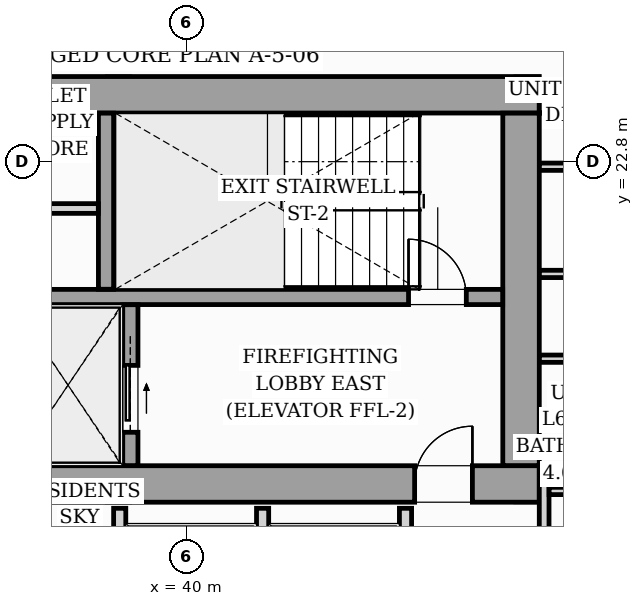
"""IFC4 building model, lengths in metres.
Left out: names, types, materials, properties, quantities, classifications, styles, units other than length and angle.
Written with IfcOpenShell. Run it as: python <this file> out.ifc"""

import sys

from ifc_helpers import new_model, si_unit, direction, frame, frame_2d, origin, origin_2d, place, context, subcontext, project, spatial, rectangle, i_section, extrude, source, transform, mapped, element, fill, save


model = new_model("IFC4")
c1 = context("Model", 3, precision=1e-05, world=origin(), true_north=direction((0.0, 1.0)))
c2 = subcontext(c1, "Body", "Model", "MODEL_VIEW")
j1 = project(units=[si_unit("LENGTHUNIT", "METRE"), si_unit("PLANEANGLEUNIT", "RADIAN")], contexts=[c1])
p1 = place(None, origin())
s1 = spatial("IfcSite", under=j1, at=p1, CompositionType="ELEMENT")
p2 = place(p1, origin())
s2 = spatial("IfcBuilding", under=s1, at=p2, CompositionType="ELEMENT")
p3 = place(p2, frame((0.0, 0.0, 223.2)))
s3 = spatial("IfcBuildingStorey", under=s2, at=p3, CompositionType="ELEMENT", Elevation=223.2)
m1 = source(origin(), c2, "Body", "SweptSolid", [
    extrude(i_section(OverallWidth=0.409, OverallDepth=0.425, WebThickness=0.033, FlangeThickness=0.052, FilletRadius=0.018, at=origin_2d()), origin(), (0.0, 0.0, 1.0), 3.296),
])
for number, where, z_axis, x_axis in (
    (1, (38.88, 17.4, 0.002), (0.0, 0.0, 1.0), (1.0, 0.0, 0.0)),
    (2, (45.6, 17.4, 0.002), (0.0, 0.0, 1.0), (1.0, 0.0, 0.0)),
    (3, (38.88, 24.0, 0.002), (0.0, 0.0, 1.0), (1.0, 0.0, 0.0)),
    (4, (45.6, 24.0, 0.002), (0.0, 0.0, 1.0), (1.0, 0.0, 0.0)),
):
    element("IfcColumn", number, at=place(p3, frame(where, z_axis=z_axis, x_axis=x_axis)), inside=s3, PredefinedType="PILASTER", context=c2, shape_type="MappedRepresentation", body=[
        mapped(m1, transform((0.0, 0.0, 0.0), scale=1.0)),
    ])
p4 = place(p3, frame((26.2, 17.5, 0.0), z_axis=(0.0, 0.0, 1.0), x_axis=(1.0, 0.0, 0.0)))
e5 = element("IfcWall", 5, at=p4, inside=s3, PredefinedType="SHEAR", context=c2, shape_type="SweptSolid", body=[
    extrude(rectangle(XDim=19.6, YDim=0.6, at=frame_2d((9.8, 0.0))), origin(), (0.0, 0.0, 1.0), 3.3),
])
p5 = place(p4, frame((0.95, 0.0, 0.0)))
e6 = element("IfcOpeningElement", 6, at=p5, cuts=e5, PredefinedType="OPENING", context=c2, shape_type="SweptSolid", body=[
    extrude(rectangle(XDim=0.95, YDim=2.06, at=frame_2d((0.475, 1.03))), frame((0.0, 0.31, 0.0), z_axis=(0.0, -1.0, 0.0), x_axis=(1.0, 0.0, 0.0)), (0.0, 0.0, 1.0), 0.62),
])
p6 = place(p4, frame((9.38, 0.0, 0.0)))
e7 = element("IfcOpeningElement", 7, at=p6, cuts=e5, PredefinedType="OPENING", context=c2, shape_type="SweptSolid", body=[
    extrude(rectangle(XDim=0.85, YDim=2.0, at=frame_2d((0.425, 1.0))), frame((0.0, 0.31, 0.0), z_axis=(0.0, -1.0, 0.0), x_axis=(1.0, 0.0, 0.0)), (0.0, 0.0, 1.0), 0.62),
])
p7 = place(p4, frame((17.55, 0.0, 0.0)))
e8 = element("IfcOpeningElement", 8, at=p7, cuts=e5, PredefinedType="OPENING", context=c2, shape_type="SweptSolid", body=[
    extrude(rectangle(XDim=0.95, YDim=2.06, at=frame_2d((0.475, 1.03))), frame((0.0, 0.31, 0.0), z_axis=(0.0, -1.0, 0.0), x_axis=(1.0, 0.0, 0.0)), (0.0, 0.0, 1.0), 0.62),
])
p8 = place(p3, frame((26.2, 23.9, 0.0), z_axis=(0.0, 0.0, 1.0), x_axis=(1.0, 0.0, 0.0)))
e9 = element("IfcWall", 9, at=p8, inside=s3, PredefinedType="SHEAR", context=c2, shape_type="SweptSolid", body=[
    extrude(rectangle(XDim=19.6, YDim=0.6, at=frame_2d((9.8, 0.0))), origin(), (0.0, 0.0, 1.0), 3.3),
])
p9 = place(p3, frame((45.5, 17.802, 0.0), z_axis=(0.0, 0.0, 1.0), x_axis=(0.0, 1.0, 0.0)))
e10 = element("IfcWall", 10, at=p9, inside=s3, PredefinedType="SHEAR", context=c2, shape_type="SweptSolid", body=[
    extrude(rectangle(XDim=5.796, YDim=0.6, at=frame_2d((2.898, 0.0))), origin(), (0.0, 0.0, 1.0), 3.3),
])
p10 = place(p3, frame((37.05, 20.575, 0.0), z_axis=(0.0, 0.0, 1.0), x_axis=(1.0, 0.0, 0.0)))
e11 = element("IfcWall", 11, at=p10, inside=s3, PredefinedType="SOLIDWALL", context=c2, shape_type="SweptSolid", body=[
    extrude(rectangle(XDim=8.148, YDim=0.25, at=frame_2d((4.074, 0.0))), origin(), (0.0, 0.0, 1.0), 3.3),
])
p11 = place(p10, frame((6.6, 0.0, 0.0)))
e12 = element("IfcOpeningElement", 12, at=p11, cuts=e11, PredefinedType="OPENING", context=c2, shape_type="SweptSolid", body=[
    extrude(rectangle(XDim=0.95, YDim=2.06, at=frame_2d((0.475, 1.03))), frame((0.0, 0.135, 0.0), z_axis=(0.0, -1.0, 0.0), x_axis=(1.0, 0.0, 0.0)), (0.0, 0.0, 1.0), 0.27),
])
p12 = place(p3, frame((38.675, 20.702, 0.0), z_axis=(0.0, 0.0, 1.0), x_axis=(0.0, 1.0, 0.0)))
e13 = element("IfcWall", 13, at=p12, inside=s3, PredefinedType="SOLIDWALL", context=c2, shape_type="SweptSolid", body=[
    extrude(rectangle(XDim=2.896, YDim=0.25, at=frame_2d((1.448, 0.0))), origin(), (0.0, 0.0, 1.0), 3.3),
])
p13 = place(p3, frame((39.075, 17.802, 0.0), z_axis=(0.0, 0.0, 1.0), x_axis=(0.0, 1.0, 0.0)))
e14 = element("IfcWall", 14, at=p13, inside=s3, PredefinedType="SOLIDWALL", context=c2, shape_type="SweptSolid", body=[
    extrude(rectangle(XDim=2.646, YDim=0.25, at=frame_2d((1.323, 0.0))), origin(), (0.0, 0.0, 1.0), 3.3),
])
p14 = place(p13, frame((0.548, 0.0, 0.0)))
e15 = element("IfcOpeningElement", 15, at=p14, cuts=e14, PredefinedType="OPENING", context=c2, shape_type="SweptSolid", body=[
    extrude(rectangle(XDim=1.1, YDim=2.08, at=frame_2d((0.55, 1.04))), frame((0.0, 0.135, 0.0), z_axis=(0.0, -1.0, 0.0), x_axis=(1.0, 0.0, 0.0)), (0.0, 0.0, 1.0), 0.27),
])
p15 = place(p3, frame((33.452, 22.03, 0.0), z_axis=(0.0, 0.0, 1.0), x_axis=(1.0, 0.0, 0.0)))
e16 = element("IfcWall", 16, at=p15, inside=s3, PredefinedType="PARTITIONING", context=c2, shape_type="SweptSolid", body=[
    extrude(rectangle(XDim=5.096, YDim=0.16, at=frame_2d((2.548, 0.0))), origin(), (0.0, 0.0, 1.0), 3.04),
])
p16 = place(p15, frame((0.538, 0.0, 0.0)))
e17 = element("IfcOpeningElement", 17, at=p16, cuts=e16, PredefinedType="OPENING", context=c2, shape_type="SweptSolid", body=[
    extrude(rectangle(XDim=0.8, YDim=2.05, at=frame_2d((0.4, 1.025))), frame((0.0, 0.09, 0.0), z_axis=(0.0, -1.0, 0.0), x_axis=(1.0, 0.0, 0.0)), (0.0, 0.0, 1.0), 0.18),
])
p17 = place(p15, frame((3.158, 0.0, 0.0)))
e18 = element("IfcOpeningElement", 18, at=p17, cuts=e16, PredefinedType="OPENING", context=c2, shape_type="SweptSolid", body=[
    extrude(rectangle(XDim=0.8, YDim=2.05, at=frame_2d((0.4, 1.025))), frame((0.0, 0.09, 0.0), z_axis=(0.0, -1.0, 0.0), x_axis=(1.0, 0.0, 0.0)), (0.0, 0.0, 1.0), 0.18),
])
for number, where, z_axis, x_axis in (
    (19, (38.9, 14.75, 0.0), (0.0, 0.0, 1.0), (0.0, 1.0, 0.0)),
    (20, (41.25, 14.75, 0.0), (0.0, 0.0, 1.0), (0.0, 1.0, 0.0)),
    (21, (43.6, 14.75, 0.0), (0.0, 0.0, 1.0), (0.0, 1.0, 0.0)),
):
    element("IfcWall", number, at=place(p3, frame(where, z_axis=z_axis, x_axis=x_axis)), inside=s3, PredefinedType="PARTITIONING", context=c2, shape_type="SweptSolid", body=[
        extrude(rectangle(XDim=2.35, YDim=0.2, at=frame_2d((1.175, 0.0))), origin(), (0.0, 0.0, 1.0), 3.04),
    ])
p18 = place(p3, frame((45.88, 13.442, 0.0), z_axis=(0.0, 0.0, 1.0), x_axis=(0.0, 1.0, 0.0)))
e22 = element("IfcWall", 22, at=p18, inside=s3, PredefinedType="PARTITIONING", context=c2, shape_type="SweptSolid", body=[
    extrude(rectangle(XDim=4.36, YDim=0.16, at=frame_2d((2.18, 0.0))), origin(), (0.0, 0.0, 1.0), 3.04),
])
p19 = place(p18, frame((0.493, 0.0, 0.0)))
e23 = element("IfcOpeningElement", 23, at=p19, cuts=e22, PredefinedType="OPENING", context=c2, shape_type="SweptSolid", body=[
    extrude(rectangle(XDim=0.95, YDim=2.06, at=frame_2d((0.475, 1.03))), frame((0.0, 0.09, 0.0), z_axis=(0.0, -1.0, 0.0), x_axis=(1.0, 0.0, 0.0)), (0.0, 0.0, 1.0), 0.18),
])
p20 = place(p3, frame((45.88, 23.598, 0.0), z_axis=(0.0, 0.0, 1.0), x_axis=(0.0, 1.0, 0.0)))
e24 = element("IfcWall", 24, at=p20, inside=s3, PredefinedType="PARTITIONING", context=c2, shape_type="SweptSolid", body=[
    extrude(rectangle(XDim=0.452, YDim=0.16, at=frame_2d((0.226, 0.0))), origin(), (0.0, 0.0, 1.0), 3.04),
])
p21 = place(p3, frame((45.962, 17.385, 0.0), z_axis=(0.0, 0.0, 1.0), x_axis=(1.0, 0.0, 0.0)))
e25 = element("IfcWall", 25, at=p21, inside=s3, PredefinedType="PARTITIONING", context=c2, shape_type="SweptSolid", body=[
    extrude(rectangle(XDim=2.256, YDim=0.12, at=frame_2d((1.128, 0.0))), origin(), (0.0, 0.0, 1.0), 2.381),
])
p22 = place(p3, frame((45.802, 19.56, 0.0), z_axis=(0.0, 0.0, 1.0), x_axis=(1.0, 0.0, 0.0)))
e26 = element("IfcWall", 26, at=p22, inside=s3, PredefinedType="PARTITIONING", context=c2, shape_type="SweptSolid", body=[
    extrude(rectangle(XDim=2.416, YDim=0.12, at=frame_2d((1.208, 0.0))), origin(), (0.0, 0.0, 1.0), 3.04),
])
p23 = place(p3, frame((45.802, 22.717, 0.0), z_axis=(0.0, 0.0, 1.0), x_axis=(1.0, 0.0, 0.0)))
e27 = element("IfcWall", 27, at=p23, inside=s3, PredefinedType="PARTITIONING", context=c2, shape_type="SweptSolid", body=[
    extrude(rectangle(XDim=9.406, YDim=0.12, at=frame_2d((4.703, 0.0))), origin(), (0.0, 0.0, 1.0), 3.04),
])
p24 = place(p23, frame((4.397, 0.0, 0.0)))
e28 = element("IfcOpeningElement", 28, at=p24, cuts=e27, PredefinedType="OPENING", context=c2, shape_type="SweptSolid", body=[
    extrude(rectangle(XDim=0.85, YDim=2.05, at=frame_2d((0.425, 1.025))), frame((0.0, 0.07, 0.0), z_axis=(0.0, -1.0, 0.0), x_axis=(1.0, 0.0, 0.0)), (0.0, 0.0, 1.0), 0.14),
])
p25 = place(p3, frame((45.802, 20.954, 0.0), z_axis=(0.0, 0.0, 1.0), x_axis=(1.0, 0.0, 0.0)))
e29 = element("IfcWall", 29, at=p25, inside=s3, PredefinedType="PARTITIONING", context=c2, shape_type="SweptSolid", body=[
    extrude(rectangle(XDim=10.683, YDim=0.12, at=frame_2d((5.342, 0.0))), origin(), (0.0, 0.0, 1.0), 3.04),
])
p26 = place(p25, frame((5.062, 0.0, 0.0)))
e30 = element("IfcOpeningElement", 30, at=p26, cuts=e29, PredefinedType="OPENING", context=c2, shape_type="SweptSolid", body=[
    extrude(rectangle(XDim=0.85, YDim=2.05, at=frame_2d((0.425, 1.025))), frame((0.0, 0.07, 0.0), z_axis=(0.0, -1.0, 0.0), x_axis=(1.0, 0.0, 0.0)), (0.0, 0.0, 1.0), 0.14),
])
m2 = source(origin(), c2, "Body", "SweptSolid", [
    extrude(rectangle(XDim=0.95, YDim=2.06, at=frame_2d((0.475, 1.03))), frame((0.0, 0.025, 0.0), z_axis=(0.0, -1.0, 0.0), x_axis=(1.0, 0.0, 0.0)), (0.0, 0.0, 1.0), 0.05),
])
p27 = place(p7, origin())
e31 = element("IfcDoor", 31, at=p27, inside=s3, OperationType="SINGLE_SWING_RIGHT", PredefinedType="DOOR", context=c2, shape_type="MappedRepresentation", body=[
    mapped(m2, transform((0.0, 0.0, 0.0), scale=1.0)),
])
fill(e8, e31)
p28 = place(p11, origin())
e32 = element("IfcDoor", 32, at=p28, inside=s3, OperationType="SINGLE_SWING_LEFT", PredefinedType="DOOR", context=c2, shape_type="MappedRepresentation", body=[
    mapped(m2, transform((0.0, 0.0, 0.0), scale=1.0)),
])
fill(e12, e32)
m3 = source(origin(), c2, "Body", "SweptSolid", [
    extrude(rectangle(XDim=1.1, YDim=2.08, at=frame_2d((0.55, 1.04))), frame((0.0, 0.025, 0.0), z_axis=(0.0, -1.0, 0.0), x_axis=(1.0, 0.0, 0.0)), (0.0, 0.0, 1.0), 0.05),
])
p29 = place(p14, origin())
e33 = element("IfcDoor", 33, at=p29, inside=s3, OperationType="SLIDING_TO_RIGHT", PredefinedType="DOOR", context=c2, shape_type="MappedRepresentation", body=[
    mapped(m3, transform((0.0, 0.0, 0.0), scale=1.0)),
])
fill(e15, e33)
save(model, sys.argv[1])
